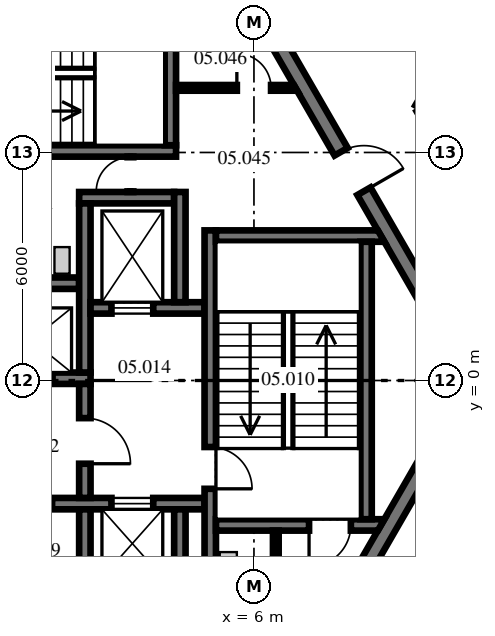
"""IFC4 building model, lengths in metres.
Left out: names, types, materials, properties, quantities, classifications, styles, units other than length and angle.
Written with IfcOpenShell. Run it as: python <this file> out.ifc"""

import sys

from ifc_helpers import new_model, si_unit, direction, frame, frame_2d, origin, place, context, subcontext, project, spatial, polyline, rectangle, outline, extrude, source, transform, mapped, element, fill, save


model = new_model("IFC4")
c1 = context("Model", 3, precision=1e-05, world=origin(), true_north=direction((0.0, 1.0)))
c2 = subcontext(c1, "Body", "Model", "MODEL_VIEW")
j1 = project(units=[si_unit("LENGTHUNIT", "METRE"), si_unit("PLANEANGLEUNIT", "RADIAN")], contexts=[c1])
p1 = place(None, origin())
s1 = spatial("IfcSite", under=j1, at=p1, CompositionType="ELEMENT")
p2 = place(p1, origin())
s2 = spatial("IfcBuilding", under=s1, at=p2, CompositionType="ELEMENT")
p3 = place(p2, frame((0.0, 0.0, 24.6)))
s3 = spatial("IfcBuildingStorey", under=s2, at=p3, CompositionType="ELEMENT", Elevation=24.6)
m1 = source(origin(), c2, "Body", "SweptSolid", [
    extrude(outline(polyline([(-0.115, -0.2), (11.885, -0.2), (11.654, 0.2), (0.115, 0.2), (-0.115, -0.2)])), origin(), (0.0, 0.0, 1.0), 4.1),
])
p4 = place(p3, frame((11.769, 0.0, 0.0), z_axis=(0.0, 0.0, 1.0), x_axis=(-0.499996592174, 0.866027371285, 0.0)))
e1 = element("IfcWall", 1, at=p4, inside=s3, PredefinedType="SHEAR", context=c2, shape_type="MappedRepresentation", body=[
    mapped(m1, transform((0.0, 0.0, 0.0), scale=1.0)),
])
p5 = place(p4, frame((5.75, 0.0, 0.0)))
e2 = element("IfcOpeningElement", 2, at=p5, cuts=e1, PredefinedType="OPENING", context=c2, shape_type="SweptSolid", body=[
    extrude(rectangle(XDim=1.2, YDim=2.1, at=frame_2d((0.6, 1.05))), frame((0.0, 0.21, 0.0), z_axis=(0.0, -1.0, 0.0), x_axis=(1.0, 0.0, 0.0)), (0.0, 0.0, 1.0), 0.42),
])
p6 = place(p3, frame((5.885, -10.192, 0.0), z_axis=(0.0, 0.0, 1.0), x_axis=(0.499996592174, 0.866027371285, 0.0)))
e3 = element("IfcWall", 3, at=p6, inside=s3, PredefinedType="SHEAR", context=c2, shape_type="MappedRepresentation", body=[
    mapped(m1, transform((0.0, 0.0, 0.0), scale=1.0)),
])
p7 = place(p6, frame((3.665, 0.0, 0.0)))
e4 = element("IfcOpeningElement", 4, at=p7, cuts=e3, PredefinedType="OPENING", context=c2, shape_type="SweptSolid", body=[
    extrude(rectangle(XDim=1.2, YDim=2.1, at=frame_2d((0.6, 1.05))), frame((0.0, 0.21, 0.0), z_axis=(0.0, -1.0, 0.0), x_axis=(1.0, 0.0, 0.0)), (0.0, 0.0, 1.0), 0.42),
])
m2 = source(origin(), c2, "Body", "SweptSolid", [
    extrude(rectangle(XDim=11.5, YDim=0.3, at=frame_2d((5.75, 0.0))), origin(), (0.0, 0.0, 1.0), 4.1),
])
p8 = place(p3, frame((-9.8, 0.06, 0.0), z_axis=(0.0, 0.0, 1.0), x_axis=(1.0, 0.0, 0.0)))
e5 = element("IfcWall", 5, at=p8, inside=s3, PredefinedType="SHEAR", context=c2, shape_type="MappedRepresentation", body=[
    mapped(m2, transform((0.0, 0.0, 0.0), scale=1.0)),
])
p9 = place(p8, frame((1.0, 0.0, 0.0)))
e6 = element("IfcOpeningElement", 6, at=p9, cuts=e5, PredefinedType="OPENING", context=c2, shape_type="SweptSolid", body=[
    extrude(rectangle(XDim=1.1, YDim=2.1, at=frame_2d((0.55, 1.05))), frame((0.0, 0.16, 0.0), z_axis=(0.0, -1.0, 0.0), x_axis=(1.0, 0.0, 0.0)), (0.0, 0.0, 1.0), 0.32),
])
p10 = place(p8, frame((3.8, 0.0, 0.0)))
e7 = element("IfcOpeningElement", 7, at=p10, cuts=e5, PredefinedType="OPENING", context=c2, shape_type="SweptSolid", body=[
    extrude(rectangle(XDim=1.1, YDim=2.1, at=frame_2d((0.55, 1.05))), frame((0.0, 0.16, 0.0), z_axis=(0.0, -1.0, 0.0), x_axis=(1.0, 0.0, 0.0)), (0.0, 0.0, 1.0), 0.32),
])
p11 = place(p8, frame((6.6, 0.0, 0.0)))
e8 = element("IfcOpeningElement", 8, at=p11, cuts=e5, PredefinedType="OPENING", context=c2, shape_type="SweptSolid", body=[
    extrude(rectangle(XDim=1.1, YDim=2.1, at=frame_2d((0.55, 1.05))), frame((0.0, 0.16, 0.0), z_axis=(0.0, -1.0, 0.0), x_axis=(1.0, 0.0, 0.0)), (0.0, 0.0, 1.0), 0.32),
])
p12 = place(p8, frame((9.4, 0.0, 0.0)))
e9 = element("IfcOpeningElement", 9, at=p12, cuts=e5, PredefinedType="OPENING", context=c2, shape_type="SweptSolid", body=[
    extrude(rectangle(XDim=1.1, YDim=2.1, at=frame_2d((0.55, 1.05))), frame((0.0, 0.16, 0.0), z_axis=(0.0, -1.0, 0.0), x_axis=(1.0, 0.0, 0.0)), (0.0, 0.0, 1.0), 0.32),
])
m3 = source(origin(), c2, "Body", "SweptSolid", [
    extrude(outline(polyline([(11.2, -0.15), (-0.349, -0.15), (-0.176, 0.15), (11.2, 0.15), (11.2, -0.15)])), origin(), (0.0, 0.0, 1.0), 4.1),
])
p13 = place(p3, frame((-9.8, 2.56, 0.0), z_axis=(0.0, 0.0, 1.0), x_axis=(1.0, 0.0, 0.0)))
e10 = element("IfcWall", 10, at=p13, inside=s3, PredefinedType="SHEAR", context=c2, shape_type="MappedRepresentation", body=[
    mapped(m3, transform((0.0, 0.0, 0.0), scale=1.0)),
])
m4 = source(origin(), c2, "Body", "SweptSolid", [
    extrude(rectangle(XDim=2.5, YDim=0.3, at=frame_2d((1.25, 0.0))), origin(), (0.0, 0.0, 1.0), 4.1),
])
p14 = place(p3, frame((1.4, 4.81, 0.0), z_axis=(0.0, 0.0, 1.0), x_axis=(1.0, 0.0, 0.0)))
e11 = element("IfcWall", 11, at=p14, inside=s3, PredefinedType="SHEAR", context=c2, shape_type="MappedRepresentation", body=[
    mapped(m4, transform((0.0, 0.0, 0.0), scale=1.0)),
])
m5 = source(origin(), c2, "Body", "SweptSolid", [
    extrude(rectangle(XDim=4.45, YDim=0.3, at=frame_2d((2.225, 0.0))), origin(), (0.0, 0.0, 1.0), 4.1),
])
p15 = place(p3, frame((1.55, 0.21, 0.0), z_axis=(0.0, 0.0, 1.0), x_axis=(0.0, 1.0, 0.0)))
e12 = element("IfcWall", 12, at=p15, inside=s3, PredefinedType="SHEAR", context=c2, shape_type="MappedRepresentation", body=[
    mapped(m5, transform((0.0, 0.0, 0.0), scale=1.0)),
])
m6 = source(origin(), c2, "Body", "SweptSolid", [
    extrude(rectangle(XDim=3.0, YDim=0.3, at=frame_2d((1.5, 0.0))), origin(), (0.0, 0.0, 1.0), 4.1),
])
p16 = place(p3, frame((1.7, 1.91, 0.0), z_axis=(0.0, 0.0, 1.0), x_axis=(1.0, 0.0, 0.0)))
e13 = element("IfcWall", 13, at=p16, inside=s3, PredefinedType="SHEAR", context=c2, shape_type="MappedRepresentation", body=[
    mapped(m6, transform((0.0, 0.0, 0.0), scale=1.0)),
])
p17 = place(p16, frame((0.55, 0.0, 0.0)))
e14 = element("IfcOpeningElement", 14, at=p17, cuts=e13, PredefinedType="OPENING", context=c2, shape_type="SweptSolid", body=[
    extrude(rectangle(XDim=1.1, YDim=2.1, at=frame_2d((0.55, 1.05))), frame((0.0, 0.16, 0.0), z_axis=(0.0, -1.0, 0.0), x_axis=(1.0, 0.0, 0.0)), (0.0, 0.0, 1.0), 0.32),
])
m7 = source(origin(), c2, "Body", "SweptSolid", [
    extrude(rectangle(XDim=2.9, YDim=0.3, at=frame_2d((1.45, 0.0))), origin(), (0.0, 0.0, 1.0), 4.1),
])
p18 = place(p3, frame((4.05, 2.06, 0.0), z_axis=(0.0, 0.0, 1.0), x_axis=(0.0, 1.0, 0.0)))
e15 = element("IfcWall", 15, at=p18, inside=s3, PredefinedType="SHEAR", context=c2, shape_type="MappedRepresentation", body=[
    mapped(m7, transform((0.0, 0.0, 0.0), scale=1.0)),
])
m8 = source(origin(), c2, "Body", "SweptSolid", [
    extrude(rectangle(XDim=12.8, YDim=0.3, at=frame_2d((6.4, 0.0))), origin(), (0.0, 0.0, 1.0), 4.1),
])
p19 = place(p3, frame((-8.1, -3.24, 0.0), z_axis=(0.0, 0.0, 1.0), x_axis=(1.0, 0.0, 0.0)))
e16 = element("IfcWall", 16, at=p19, inside=s3, PredefinedType="SHEAR", context=c2, shape_type="MappedRepresentation", body=[
    mapped(m8, transform((0.0, 0.0, 0.0), scale=1.0)),
])
p20 = place(p19, frame((2.212, 0.0, 0.0)))
e17 = element("IfcOpeningElement", 17, at=p20, cuts=e16, PredefinedType="OPENING", context=c2, shape_type="SweptSolid", body=[
    extrude(rectangle(XDim=0.9, YDim=2.1, at=frame_2d((0.45, 1.05))), frame((0.0, 0.16, 0.0), z_axis=(0.0, -1.0, 0.0), x_axis=(1.0, 0.0, 0.0)), (0.0, 0.0, 1.0), 0.32),
])
p21 = place(p19, frame((5.65, 0.0, 0.0)))
e18 = element("IfcOpeningElement", 18, at=p21, cuts=e16, PredefinedType="OPENING", context=c2, shape_type="SweptSolid", body=[
    extrude(rectangle(XDim=0.9, YDim=2.1, at=frame_2d((0.45, 1.05))), frame((0.0, 0.16, 0.0), z_axis=(0.0, -1.0, 0.0), x_axis=(1.0, 0.0, 0.0)), (0.0, 0.0, 1.0), 0.32),
])
p22 = place(p19, frame((7.887, 0.0, 0.0)))
e19 = element("IfcOpeningElement", 19, at=p22, cuts=e16, PredefinedType="OPENING", context=c2, shape_type="SweptSolid", body=[
    extrude(rectangle(XDim=0.9, YDim=2.1, at=frame_2d((0.45, 1.05))), frame((0.0, 0.16, 0.0), z_axis=(0.0, -1.0, 0.0), x_axis=(1.0, 0.0, 0.0)), (0.0, 0.0, 1.0), 0.32),
])
p23 = place(p19, frame((10.35, 0.0, 0.0)))
e20 = element("IfcOpeningElement", 20, at=p23, cuts=e16, PredefinedType="OPENING", context=c2, shape_type="SweptSolid", body=[
    extrude(rectangle(XDim=1.1, YDim=2.1, at=frame_2d((0.55, 1.05))), frame((0.0, 0.16, 0.0), z_axis=(0.0, -1.0, 0.0), x_axis=(1.0, 0.0, 0.0)), (0.0, 0.0, 1.0), 0.32),
])
m9 = source(origin(), c2, "Body", "SweptSolid", [
    extrude(rectangle(XDim=2.2, YDim=0.3, at=frame_2d((1.1, 0.0))), origin(), (0.0, 0.0, 1.0), 4.1),
])
p24 = place(p3, frame((1.55, -5.59, 0.0), z_axis=(0.0, 0.0, 1.0), x_axis=(0.0, 1.0, 0.0)))
e21 = element("IfcWall", 21, at=p24, inside=s3, PredefinedType="SHEAR", context=c2, shape_type="MappedRepresentation", body=[
    mapped(m9, transform((0.0, 0.0, 0.0), scale=1.0)),
])
p25 = place(p3, frame((4.05, -5.89, 0.0), z_axis=(0.0, 0.0, 1.0), x_axis=(0.0, 1.0, 0.0)))
e22 = element("IfcWall", 22, at=p25, inside=s3, PredefinedType="SHEAR", context=c2, shape_type="MappedRepresentation", body=[
    mapped(m4, transform((0.0, 0.0, 0.0), scale=1.0)),
])
p26 = place(p3, frame((1.55, -3.09, 0.0), z_axis=(0.0, 0.0, 1.0), x_axis=(0.0, 1.0, 0.0)))
e23 = element("IfcWall", 23, at=p26, inside=s3, PredefinedType="SHEAR", context=c2, shape_type="MappedRepresentation", body=[
    mapped(m6, transform((0.0, 0.0, 0.0), scale=1.0)),
])
p27 = place(p26, frame((0.9, 0.0, 0.0)))
e24 = element("IfcOpeningElement", 24, at=p27, cuts=e23, PredefinedType="OPENING", context=c2, shape_type="SweptSolid", body=[
    extrude(rectangle(XDim=1.2, YDim=2.1, at=frame_2d((0.6, 1.05))), frame((0.0, 0.16, 0.0), z_axis=(0.0, -1.0, 0.0), x_axis=(1.0, 0.0, 0.0)), (0.0, 0.0, 1.0), 0.32),
])
m10 = source(origin(), c2, "Body", "SweptSolid", [
    extrude(outline(polyline([(-0.15, -0.15), (9.99, -0.15), (9.99, 0.15), (0.15, 0.15), (-0.15, -0.15)])), origin(), (0.0, 0.0, 1.0), 4.1),
])
p28 = place(p3, frame((4.85, -6.04, 0.0), z_axis=(0.0, 0.0, 1.0), x_axis=(0.0, 1.0, 0.0)))
e25 = element("IfcWall", 25, at=p28, inside=s3, PredefinedType="SHEAR", context=c2, shape_type="MappedRepresentation", body=[
    mapped(m10, transform((0.0, 0.0, 0.0), scale=1.0)),
])
p29 = place(p28, frame((3.19, 0.0, 0.0)))
e26 = element("IfcOpeningElement", 26, at=p29, cuts=e25, PredefinedType="OPENING", context=c2, shape_type="SweptSolid", body=[
    extrude(rectangle(XDim=1.1, YDim=2.1, at=frame_2d((0.55, 1.05))), frame((0.0, 0.16, 0.0), z_axis=(0.0, -1.0, 0.0), x_axis=(1.0, 0.0, 0.0)), (0.0, 0.0, 1.0), 0.32),
])
m11 = source(origin(), c2, "Body", "SweptSolid", [
    extrude(outline(polyline([(0.0, -0.15), (0.0, 0.15), (4.26, 0.15), (4.433, -0.15), (0.0, -0.15)])), origin(), (0.0, 0.0, 1.0), 4.1),
])
p30 = place(p3, frame((5.0, 3.8, 0.0), z_axis=(0.0, 0.0, 1.0), x_axis=(1.0, 0.0, 0.0)))
e27 = element("IfcWall", 27, at=p30, inside=s3, PredefinedType="SHEAR", context=c2, shape_type="MappedRepresentation", body=[
    mapped(m11, transform((0.0, 0.0, 0.0), scale=1.0)),
])
m12 = source(origin(), c2, "Body", "SweptSolid", [
    extrude(outline(polyline([(0.0, -0.15), (0.0, 0.15), (4.433, 0.15), (4.26, -0.15), (0.0, -0.15)])), origin(), (0.0, 0.0, 1.0), 4.1),
])
p31 = place(p3, frame((5.0, -3.8, 0.0), z_axis=(0.0, 0.0, 1.0), x_axis=(1.0, 0.0, 0.0)))
e28 = element("IfcWall", 28, at=p31, inside=s3, PredefinedType="SHEAR", context=c2, shape_type="MappedRepresentation", body=[
    mapped(m12, transform((0.0, 0.0, 0.0), scale=1.0)),
])
p32 = place(p31, frame((2.45, 0.0, 0.0)))
e29 = element("IfcOpeningElement", 29, at=p32, cuts=e28, PredefinedType="OPENING", context=c2, shape_type="SweptSolid", body=[
    extrude(rectangle(XDim=1.1, YDim=2.1, at=frame_2d((0.55, 1.05))), frame((0.0, 0.16, 0.0), z_axis=(0.0, -1.0, 0.0), x_axis=(1.0, 0.0, 0.0)), (0.0, 0.0, 1.0), 0.32),
])
m13 = source(origin(), c2, "Body", "SweptSolid", [
    extrude(rectangle(XDim=7.3, YDim=0.3, at=frame_2d((3.65, 0.0))), origin(), (0.0, 0.0, 1.0), 4.1),
])
p33 = place(p3, frame((8.95, -3.65, 0.0), z_axis=(0.0, 0.0, 1.0), x_axis=(0.0, 1.0, 0.0)))
e30 = element("IfcWall", 30, at=p33, inside=s3, PredefinedType="SHEAR", context=c2, shape_type="MappedRepresentation", body=[
    mapped(m13, transform((0.0, 0.0, 0.0), scale=1.0)),
])
m14 = source(origin(), c2, "Body", "SweptSolid", [
    extrude(rectangle(XDim=7.9, YDim=0.3, at=frame_2d((3.95, 0.0))), origin(), (0.0, 0.0, 1.0), 4.1),
])
p34 = place(p3, frame((-3.95, 6.04, 0.0), z_axis=(0.0, 0.0, 1.0), x_axis=(1.0, 0.0, 0.0)))
e31 = element("IfcWall", 31, at=p34, inside=s3, PredefinedType="SHEAR", context=c2, shape_type="MappedRepresentation", body=[
    mapped(m14, transform((0.0, 0.0, 0.0), scale=1.0)),
])
m15 = source(origin(), c2, "Body", "SweptSolid", [
    extrude(outline(polyline([(0.0, -0.15), (0.0, 0.15), (3.804, 0.15), (3.804, -0.15), (0.0, -0.15)])), origin(), (0.0, 0.0, 1.0), 4.1),
])
p35 = place(p3, frame((3.8, 6.19, 0.0), z_axis=(0.0, 0.0, 1.0), x_axis=(0.0, 1.0, 0.0)))
e32 = element("IfcWall", 32, at=p35, inside=s3, PredefinedType="SHEAR", context=c2, shape_type="MappedRepresentation", body=[
    mapped(m15, transform((0.0, 0.0, 0.0), scale=1.0)),
])
m16 = source(origin(), c2, "Body", "SweptSolid", [
    extrude(outline(polyline([(-0.075, -0.075), (4.05, -0.075), (4.05, 0.075), (0.075, 0.075), (-0.075, -0.075)])), origin(), (0.0, 0.0, 1.0), 4.1),
])
p36 = place(p3, frame((6.575, -8.0, 0.0), z_axis=(0.0, 0.0, 1.0), x_axis=(0.0, 1.0, 0.0)))
e33 = element("IfcWall", 33, at=p36, inside=s3, PredefinedType="PARTITIONING", context=c2, shape_type="MappedRepresentation", body=[
    mapped(m16, transform((0.0, 0.0, 0.0), scale=1.0)),
])
m17 = source(origin(), c2, "Body", "SweptSolid", [
    extrude(outline(polyline([(0.0, -0.075), (0.0, 0.075), (3.102, 0.075), (3.188, -0.075), (0.0, -0.075)])), origin(), (0.0, 0.0, 1.0), 4.1),
])
p37 = place(p3, frame((3.95, 7.7, 0.0), z_axis=(0.0, 0.0, 1.0), x_axis=(1.0, 0.0, 0.0)))
e34 = element("IfcWall", 34, at=p37, inside=s3, PredefinedType="PARTITIONING", context=c2, shape_type="MappedRepresentation", body=[
    mapped(m17, transform((0.0, 0.0, 0.0), scale=1.0)),
])
p38 = place(p37, frame((1.6, 0.0, 0.0)))
e35 = element("IfcOpeningElement", 35, at=p38, cuts=e34, PredefinedType="OPENING", context=c2, shape_type="SweptSolid", body=[
    extrude(rectangle(XDim=0.9, YDim=2.1, at=frame_2d((0.45, 1.05))), frame((0.0, 0.085, 0.0), z_axis=(0.0, -1.0, 0.0), x_axis=(1.0, 0.0, 0.0)), (0.0, 0.0, 1.0), 0.17),
])
m18 = source(origin(), c2, "Body", "SweptSolid", [
    extrude(rectangle(XDim=0.93, YDim=0.15, at=frame_2d((0.465, 0.0))), origin(), (0.0, 0.0, 1.0), 4.1),
])
p39 = place(p3, frame((2.75, 4.96, 0.0), z_axis=(0.0, 0.0, 1.0), x_axis=(0.0, 1.0, 0.0)))
e36 = element("IfcWall", 36, at=p39, inside=s3, PredefinedType="PARTITIONING", context=c2, shape_type="MappedRepresentation", body=[
    mapped(m18, transform((0.0, 0.0, 0.0), scale=1.0)),
])
p40 = place(p39, frame((0.015, 0.0, 0.0)))
e37 = element("IfcOpeningElement", 37, at=p40, cuts=e36, PredefinedType="OPENING", context=c2, shape_type="SweptSolid", body=[
    extrude(rectangle(XDim=0.9, YDim=2.1, at=frame_2d((0.45, 1.05))), frame((0.0, 0.085, 0.0), z_axis=(0.0, -1.0, 0.0), x_axis=(1.0, 0.0, 0.0)), (0.0, 0.0, 1.0), 0.17),
])
m19 = source(origin(), c2, "Body", "SweptSolid", [
    extrude(rectangle(XDim=20.193, YDim=0.2, at=frame_2d((10.096, 0.0))), origin(), (0.0, 0.0, 1.0), 4.1),
])
p41 = place(p3, frame((10.333, 7.187, 0.0), z_axis=(0.0, 0.0, 1.0), x_axis=(0.499999796593, 0.866025521222, 0.0)))
e38 = element("IfcWall", 38, at=p41, inside=s3, PredefinedType="PARTITIONING", context=c2, shape_type="MappedRepresentation", body=[
    mapped(m19, transform((0.0, 0.0, 0.0), scale=1.0)),
])
p42 = place(p41, frame((6.639, 0.0, 0.0)))
e39 = element("IfcOpeningElement", 39, at=p42, cuts=e38, PredefinedType="OPENING", context=c2, shape_type="SweptSolid", body=[
    extrude(rectangle(XDim=1.0, YDim=2.1, at=frame_2d((0.5, 1.05))), frame((0.0, 0.11, 0.0), z_axis=(0.0, -1.0, 0.0), x_axis=(1.0, 0.0, 0.0)), (0.0, 0.0, 1.0), 0.22),
])
p43 = place(p5, frame((1.2, 0.0, 0.0), z_axis=(0.0, 0.0, 1.0), x_axis=(-1.0, 0.0, 0.0)))
e40 = element("IfcDoor", 40, at=p43, inside=s3, OperationType="SINGLE_SWING_RIGHT", PredefinedType="DOOR", context=c2, shape_type="SweptSolid", body=[
    extrude(rectangle(XDim=1.2, YDim=2.1, at=frame_2d((0.6, 1.05))), frame((0.0, 0.025, 0.0), z_axis=(0.0, -1.0, 0.0), x_axis=(1.0, 0.0, 0.0)), (0.0, 0.0, 1.0), 0.05),
])
fill(e2, e40)
p44 = place(p29, frame((1.1, 0.0, 0.0), z_axis=(0.0, 0.0, 1.0), x_axis=(-1.0, 0.0, 0.0)))
e41 = element("IfcDoor", 41, at=p44, inside=s3, OperationType="SINGLE_SWING_RIGHT", PredefinedType="DOOR", context=c2, shape_type="SweptSolid", body=[
    extrude(rectangle(XDim=1.1, YDim=2.1, at=frame_2d((0.55, 1.05))), frame((0.0, 0.025, 0.0), z_axis=(0.0, -1.0, 0.0), x_axis=(1.0, 0.0, 0.0)), (0.0, 0.0, 1.0), 0.05),
])
fill(e26, e41)
p45 = place(p32, frame((1.1, 0.0, 0.0), z_axis=(0.0, 0.0, 1.0), x_axis=(-1.0, 0.0, 0.0)))
e42 = element("IfcDoor", 42, at=p45, inside=s3, OperationType="SINGLE_SWING_RIGHT", PredefinedType="DOOR", context=c2, shape_type="SweptSolid", body=[
    extrude(rectangle(XDim=1.1, YDim=2.1, at=frame_2d((0.55, 1.05))), frame((0.0, 0.025, 0.0), z_axis=(0.0, -1.0, 0.0), x_axis=(1.0, 0.0, 0.0)), (0.0, 0.0, 1.0), 0.05),
])
fill(e29, e42)
p46 = place(p27, frame((1.2, 0.0, 0.0), z_axis=(0.0, 0.0, 1.0), x_axis=(-1.0, 0.0, 0.0)))
e43 = element("IfcDoor", 43, at=p46, inside=s3, OperationType="SINGLE_SWING_RIGHT", PredefinedType="DOOR", context=c2, shape_type="SweptSolid", body=[
    extrude(rectangle(XDim=1.2, YDim=2.1, at=frame_2d((0.6, 1.05))), frame((0.0, 0.025, 0.0), z_axis=(0.0, -1.0, 0.0), x_axis=(1.0, 0.0, 0.0)), (0.0, 0.0, 1.0), 0.05),
])
fill(e24, e43)
p47 = place(p40, origin())
e44 = element("IfcDoor", 44, at=p47, inside=s3, OperationType="SINGLE_SWING_LEFT", PredefinedType="DOOR", context=c2, shape_type="SweptSolid", body=[
    extrude(rectangle(XDim=0.9, YDim=2.1, at=frame_2d((0.45, 1.05))), frame((0.0, 0.025, 0.0), z_axis=(0.0, -1.0, 0.0), x_axis=(1.0, 0.0, 0.0)), (0.0, 0.0, 1.0), 0.05),
])
fill(e37, e44)
p48 = place(p38, origin())
e45 = element("IfcDoor", 45, at=p48, inside=s3, OperationType="SINGLE_SWING_LEFT", PredefinedType="DOOR", context=c2, shape_type="SweptSolid", body=[
    extrude(rectangle(XDim=0.9, YDim=2.1, at=frame_2d((0.45, 1.05))), frame((0.0, 0.025, 0.0), z_axis=(0.0, -1.0, 0.0), x_axis=(1.0, 0.0, 0.0)), (0.0, 0.0, 1.0), 0.05),
])
fill(e35, e45)
p49 = place(p17, origin())
e46 = element("IfcDoor", 46, at=p49, inside=s3, OperationType="DOUBLE_DOOR_SLIDING", PredefinedType="DOOR", context=c2, shape_type="SweptSolid", body=[
    extrude(rectangle(XDim=1.1, YDim=2.1, at=frame_2d((0.55, 1.05))), frame((0.0, 0.025, 0.0), z_axis=(0.0, -1.0, 0.0), x_axis=(1.0, 0.0, 0.0)), (0.0, 0.0, 1.0), 0.05),
])
fill(e14, e46)
p50 = place(p23, origin())
e47 = element("IfcDoor", 47, at=p50, inside=s3, OperationType="DOUBLE_DOOR_SLIDING", PredefinedType="DOOR", context=c2, shape_type="SweptSolid", body=[
    extrude(rectangle(XDim=1.1, YDim=2.1, at=frame_2d((0.55, 1.05))), frame((0.0, 0.025, 0.0), z_axis=(0.0, -1.0, 0.0), x_axis=(1.0, 0.0, 0.0)), (0.0, 0.0, 1.0), 0.05),
])
fill(e20, e47)
save(model, sys.argv[1])
